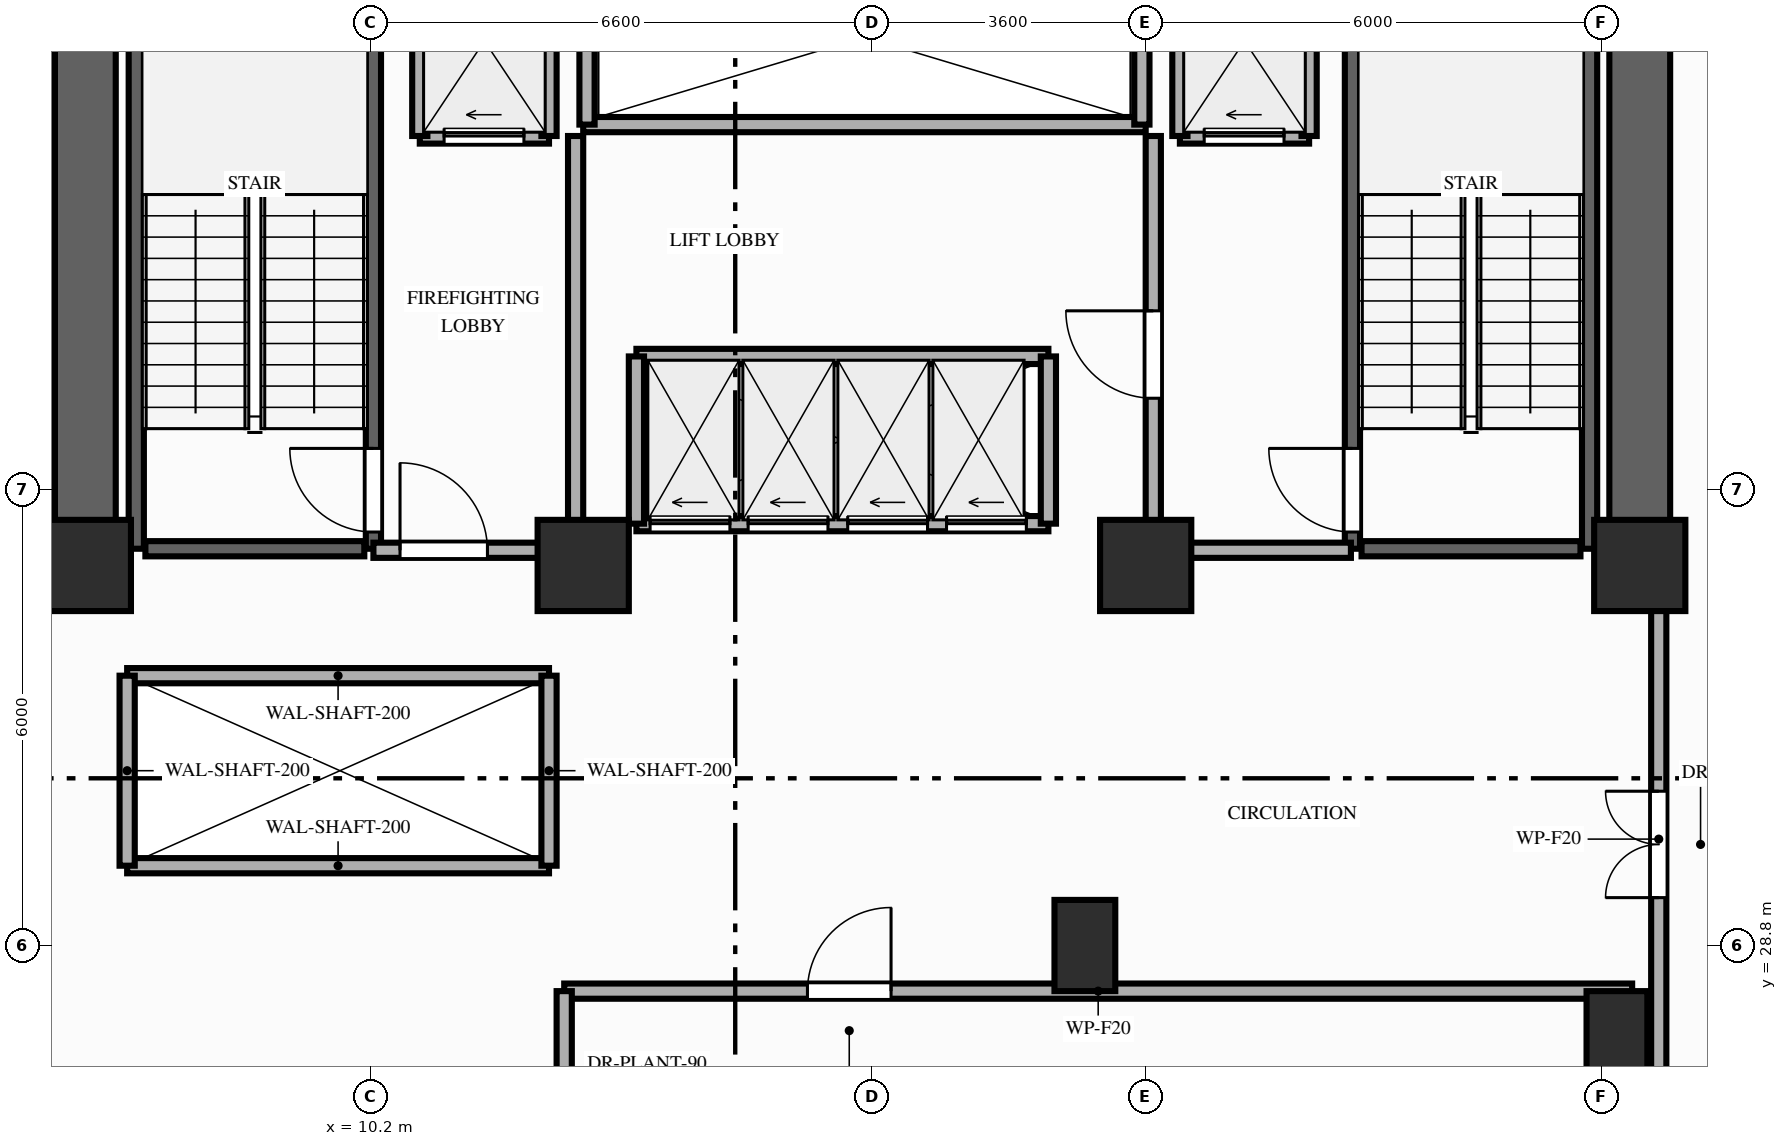
"""IFC4 building model, lengths in metres.
Left out: names, types, materials, properties, quantities, classifications, styles, units other than length and angle.
Written with IfcOpenShell. Run it as: python <this file> out.ifc"""

import sys

from ifc_helpers import new_model, si_unit, direction, frame, frame_2d, origin, origin_2d, place, context, subcontext, project, spatial, rectangle, extrude, element, fill, save


model = new_model("IFC4")
c1 = context("Model", 3, precision=1e-05, world=origin(), true_north=direction((0.0, 1.0)))
c2 = subcontext(c1, "Body", "Model", "MODEL_VIEW")
j1 = project(units=[si_unit("LENGTHUNIT", "METRE"), si_unit("PLANEANGLEUNIT", "RADIAN")], contexts=[c1])
p1 = place(None, origin())
s1 = spatial("IfcSite", under=j1, at=p1, CompositionType="ELEMENT")
p2 = place(p1, origin())
s2 = spatial("IfcBuilding", under=s1, at=p2, CompositionType="ELEMENT")
p3 = place(p2, frame((0.0, 0.0, 79.4)))
s3 = spatial("IfcBuildingStorey", under=s2, at=p3, CompositionType="ELEMENT", Elevation=79.4)
for number, where, z_axis, x_axis in (
    (1, (6.45, 33.8, 0.0), (0.0, 0.0, 1.0), (1.0, 0.0, 0.0)),
    (2, (13.0, 33.8, 0.0), (0.0, 0.0, 1.0), (1.0, 0.0, 0.0)),
    (3, (20.4, 33.8, 0.0), (0.0, 0.0, 1.0), (1.0, 0.0, 0.0)),
    (4, (26.9, 33.8, 0.0), (0.0, 0.0, 1.0), (1.0, 0.0, 0.0)),
):
    element("IfcColumn", number, at=place(p3, frame(where, z_axis=z_axis, x_axis=x_axis)), inside=s3, PredefinedType="COLUMN", context=c2, shape_type="SweptSolid", body=[
        extrude(rectangle(XDim=1.2, YDim=1.2, at=origin_2d()), origin(), (0.0, 0.0, 1.0), 4.0),
    ])
for number, where, z_axis, x_axis in (
    (5, (19.6, 28.8, 0.0), (0.0, 0.0, 1.0), (1.0, 0.0, 0.0)),
    (6, (26.6, 27.6, 0.0), (0.0, 0.0, 1.0), (1.0, 0.0, 0.0)),
):
    element("IfcColumn", number, at=place(p3, frame(where, z_axis=z_axis, x_axis=x_axis)), inside=s3, PredefinedType="COLUMN", context=c2, shape_type="SweptSolid", body=[
        extrude(rectangle(XDim=0.8, YDim=1.2, at=origin_2d()), origin(), (0.0, 0.0, 1.0), 4.0),
    ])
for number, where, z_axis, x_axis in (
    (7, (6.45, 33.8, 0.0), (0.0, 0.0, 1.0), (0.0, 1.0, 0.0)),
    (8, (26.9, 33.8, 0.0), (0.0, 0.0, 1.0), (0.0, 1.0, 0.0)),
):
    element("IfcWall", number, at=place(p3, frame(where, z_axis=z_axis, x_axis=x_axis)), inside=s3, PredefinedType="SHEAR", context=c2, shape_type="SweptSolid", body=[
        extrude(rectangle(XDim=7.95, YDim=0.8, at=frame_2d((3.975, 0.0))), origin(), (0.0, 0.0, 1.0), 3.82),
    ])
p4 = place(p3, frame((7.12, 34.02, 0.0), z_axis=(0.0, 0.0, 1.0), x_axis=(0.0, 1.0, 0.0)))
e9 = element("IfcWall", 9, at=p4, inside=s3, PredefinedType="SHEAR", context=c2, shape_type="SweptSolid", body=[
    extrude(rectangle(XDim=7.78, YDim=0.2, at=frame_2d((3.89, 0.0))), origin(), (0.0, 0.0, 1.0), 3.82),
])
p5 = place(p3, frame((10.24, 34.02, 0.0), z_axis=(0.0, 0.0, 1.0), x_axis=(0.0, 1.0, 0.0)))
e10 = element("IfcWall", 10, at=p5, inside=s3, PredefinedType="SHEAR", context=c2, shape_type="SweptSolid", body=[
    extrude(rectangle(XDim=7.78, YDim=0.2, at=frame_2d((3.89, 0.0))), origin(), (0.0, 0.0, 1.0), 3.82),
])
p6 = place(p5, frame((0.22, 0.0, 0.0)))
e11 = element("IfcOpeningElement", 11, at=p6, cuts=e10, PredefinedType="OPENING", context=c2, shape_type="SweptSolid", body=[
    extrude(rectangle(XDim=1.1, YDim=2.15, at=frame_2d((0.55, 1.075))), frame((0.0, 0.11, 0.0), z_axis=(0.0, -1.0, 0.0), x_axis=(1.0, 0.0, 0.0)), (0.0, 0.0, 1.0), 0.22),
])
p7 = place(p3, frame((7.24, 34.02, 0.0), z_axis=(0.0, 0.0, 1.0), x_axis=(1.0, 0.0, 0.0)))
e12 = element("IfcWall", 12, at=p7, inside=s3, PredefinedType="SHEAR", context=c2, shape_type="SweptSolid", body=[
    extrude(rectangle(XDim=2.88, YDim=0.2, at=frame_2d((1.44, 0.0))), origin(), (0.0, 0.0, 1.0), 3.82),
])
p8 = place(p3, frame((23.12, 34.02, 0.0), z_axis=(0.0, 0.0, 1.0), x_axis=(0.0, 1.0, 0.0)))
e13 = element("IfcWall", 13, at=p8, inside=s3, PredefinedType="SHEAR", context=c2, shape_type="SweptSolid", body=[
    extrude(rectangle(XDim=7.78, YDim=0.2, at=frame_2d((3.89, 0.0))), origin(), (0.0, 0.0, 1.0), 3.82),
])
p9 = place(p8, frame((0.22, 0.0, 0.0)))
e14 = element("IfcOpeningElement", 14, at=p9, cuts=e13, PredefinedType="OPENING", context=c2, shape_type="SweptSolid", body=[
    extrude(rectangle(XDim=1.1, YDim=2.15, at=frame_2d((0.55, 1.075))), frame((0.0, 0.11, 0.0), z_axis=(0.0, -1.0, 0.0), x_axis=(1.0, 0.0, 0.0)), (0.0, 0.0, 1.0), 0.22),
])
p10 = place(p3, frame((26.24, 34.02, 0.0), z_axis=(0.0, 0.0, 1.0), x_axis=(0.0, 1.0, 0.0)))
e15 = element("IfcWall", 15, at=p10, inside=s3, PredefinedType="SHEAR", context=c2, shape_type="SweptSolid", body=[
    extrude(rectangle(XDim=7.78, YDim=0.2, at=frame_2d((3.89, 0.0))), origin(), (0.0, 0.0, 1.0), 3.82),
])
p11 = place(p3, frame((23.24, 34.02, 0.0), z_axis=(0.0, 0.0, 1.0), x_axis=(1.0, 0.0, 0.0)))
e16 = element("IfcWall", 16, at=p11, inside=s3, PredefinedType="SHEAR", context=c2, shape_type="SweptSolid", body=[
    extrude(rectangle(XDim=2.88, YDim=0.2, at=frame_2d((1.44, 0.0))), origin(), (0.0, 0.0, 1.0), 3.82),
])
for number, where, z_axis, x_axis in (
    (17, (7.0, 29.85, 0.0), (0.0, 0.0, 1.0), (1.0, 0.0, 0.0)),
    (18, (7.0, 32.35, 0.0), (0.0, 0.0, 1.0), (1.0, 0.0, 0.0)),
):
    element("IfcWall", number, at=place(p3, frame(where, z_axis=z_axis, x_axis=x_axis)), inside=s3, PredefinedType="MOVABLE", context=c2, shape_type="SweptSolid", body=[
        extrude(rectangle(XDim=5.55, YDim=0.2, at=frame_2d((2.775, 0.0))), origin(), (0.0, 0.0, 1.0), 3.82),
    ])
for number, where, z_axis, x_axis in (
    (19, (7.0, 29.85, 0.0), (0.0, 0.0, 1.0), (0.0, 1.0, 0.0)),
    (20, (12.55, 29.85, 0.0), (0.0, 0.0, 1.0), (0.0, 1.0, 0.0)),
):
    element("IfcWall", number, at=place(p3, frame(where, z_axis=z_axis, x_axis=x_axis)), inside=s3, PredefinedType="MOVABLE", context=c2, shape_type="SweptSolid", body=[
        extrude(rectangle(XDim=2.5, YDim=0.2, at=frame_2d((1.25, 0.0))), origin(), (0.0, 0.0, 1.0), 3.82),
    ])
p12 = place(p3, frame((10.85, 39.45, 0.0), z_axis=(0.0, 0.0, 1.0), x_axis=(1.0, 0.0, 0.0)))
e21 = element("IfcWall", 21, at=p12, inside=s3, PredefinedType="MOVABLE", context=c2, shape_type="SweptSolid", body=[
    extrude(rectangle(XDim=1.7, YDim=0.2, at=frame_2d((0.85, 0.0))), origin(), (0.0, 0.0, 1.0), 3.82),
])
p13 = place(p12, frame((0.32, 0.0, 0.0)))
e22 = element("IfcOpeningElement", 22, at=p13, cuts=e21, PredefinedType="OPENING", context=c2, shape_type="SweptSolid", body=[
    extrude(rectangle(XDim=1.05, YDim=2.15, at=frame_2d((0.525, 1.075))), frame((0.0, 0.11, 0.0), z_axis=(0.0, -1.0, 0.0), x_axis=(1.0, 0.0, 0.0)), (0.0, 0.0, 1.0), 0.22),
])
p14 = place(p3, frame((20.85, 39.45, 0.0), z_axis=(0.0, 0.0, 1.0), x_axis=(1.0, 0.0, 0.0)))
e23 = element("IfcWall", 23, at=p14, inside=s3, PredefinedType="MOVABLE", context=c2, shape_type="SweptSolid", body=[
    extrude(rectangle(XDim=1.7, YDim=0.2, at=frame_2d((0.85, 0.0))), origin(), (0.0, 0.0, 1.0), 3.82),
])
p15 = place(p14, frame((0.32, 0.0, 0.0)))
e24 = element("IfcOpeningElement", 24, at=p15, cuts=e23, PredefinedType="OPENING", context=c2, shape_type="SweptSolid", body=[
    extrude(rectangle(XDim=1.05, YDim=2.15, at=frame_2d((0.525, 1.075))), frame((0.0, 0.11, 0.0), z_axis=(0.0, -1.0, 0.0), x_axis=(1.0, 0.0, 0.0)), (0.0, 0.0, 1.0), 0.22),
])
for number, where, z_axis, x_axis in (
    (25, (10.85, 39.45, 0.0), (0.0, 0.0, 1.0), (0.0, 1.0, 0.0)),
    (26, (12.55, 39.45, 0.0), (0.0, 0.0, 1.0), (0.0, 1.0, 0.0)),
):
    element("IfcWall", number, at=place(p3, frame(where, z_axis=z_axis, x_axis=x_axis)), inside=s3, PredefinedType="MOVABLE", context=c2, shape_type="SweptSolid", body=[
        extrude(rectangle(XDim=2.65, YDim=0.2, at=frame_2d((1.325, 0.0))), origin(), (0.0, 0.0, 1.0), 3.21),
    ])
p16 = place(p3, frame((12.9, 34.0, 0.0), z_axis=(0.0, 0.0, 1.0), x_axis=(0.0, 1.0, 0.0)))
e27 = element("IfcWall", 27, at=p16, inside=s3, PredefinedType="PARTITIONING", context=c2, shape_type="SweptSolid", body=[
    extrude(rectangle(XDim=5.45, YDim=0.2, at=frame_2d((2.725, 0.0))), origin(), (0.0, 0.0, 1.0), 3.21),
])
p17 = place(p3, frame((10.24, 34.0, 0.0), z_axis=(0.0, 0.0, 1.0), x_axis=(1.0, 0.0, 0.0)))
e28 = element("IfcWall", 28, at=p17, inside=s3, PredefinedType="PARTITIONING", context=c2, shape_type="SweptSolid", body=[
    extrude(rectangle(XDim=2.66, YDim=0.2, at=frame_2d((1.33, 0.0))), origin(), (0.0, 0.0, 1.0), 3.21),
])
p18 = place(p17, frame((0.35, 0.0, 0.0)))
e29 = element("IfcOpeningElement", 29, at=p18, cuts=e28, PredefinedType="OPENING", context=c2, shape_type="SweptSolid", body=[
    extrude(rectangle(XDim=1.15, YDim=2.15, at=frame_2d((0.575, 1.075))), frame((0.0, 0.11, 0.0), z_axis=(0.0, -1.0, 0.0), x_axis=(1.0, 0.0, 0.0)), (0.0, 0.0, 1.0), 0.22),
])
for number, where, z_axis, x_axis in (
    (30, (20.85, 39.45, 0.0), (0.0, 0.0, 1.0), (0.0, 1.0, 0.0)),
    (31, (22.55, 39.45, 0.0), (0.0, 0.0, 1.0), (0.0, 1.0, 0.0)),
):
    element("IfcWall", number, at=place(p3, frame(where, z_axis=z_axis, x_axis=x_axis)), inside=s3, PredefinedType="MOVABLE", context=c2, shape_type="SweptSolid", body=[
        extrude(rectangle(XDim=2.65, YDim=0.2, at=frame_2d((1.325, 0.0))), origin(), (0.0, 0.0, 1.0), 3.21),
    ])
p19 = place(p3, frame((20.5, 34.0, 0.0), z_axis=(0.0, 0.0, 1.0), x_axis=(0.0, 1.0, 0.0)))
e32 = element("IfcWall", 32, at=p19, inside=s3, PredefinedType="PARTITIONING", context=c2, shape_type="SweptSolid", body=[
    extrude(rectangle(XDim=5.45, YDim=0.2, at=frame_2d((2.725, 0.0))), origin(), (0.0, 0.0, 1.0), 3.21),
])
p20 = place(p19, frame((2.0, 0.0, 0.0)))
e33 = element("IfcOpeningElement", 33, at=p20, cuts=e32, PredefinedType="OPENING", context=c2, shape_type="SweptSolid", body=[
    extrude(rectangle(XDim=1.15, YDim=2.15, at=frame_2d((0.575, 1.075))), frame((0.0, 0.11, 0.0), z_axis=(0.0, -1.0, 0.0), x_axis=(1.0, 0.0, 0.0)), (0.0, 0.0, 1.0), 0.22),
])
p21 = place(p3, frame((20.5, 34.0, 0.0), z_axis=(0.0, 0.0, 1.0), x_axis=(1.0, 0.0, 0.0)))
e34 = element("IfcWall", 34, at=p21, inside=s3, PredefinedType="PARTITIONING", context=c2, shape_type="SweptSolid", body=[
    extrude(rectangle(XDim=2.6, YDim=0.2, at=frame_2d((1.3, 0.0))), origin(), (0.0, 0.0, 1.0), 3.21),
])
p22 = place(p3, frame((13.0, 39.6, 0.0), z_axis=(0.0, 0.0, 1.0), x_axis=(1.0, 0.0, 0.0)))
e35 = element("IfcWall", 35, at=p22, inside=s3, PredefinedType="MOVABLE", context=c2, shape_type="SweptSolid", body=[
    extrude(rectangle(XDim=7.4, YDim=0.2, at=frame_2d((3.7, 0.0))), origin(), (0.0, 0.0, 1.0), 3.82),
])
for number, where, z_axis, x_axis in (
    (36, (13.05, 39.6, 0.0), (0.0, 0.0, 1.0), (0.0, 1.0, 0.0)),
    (37, (20.35, 39.6, 0.0), (0.0, 0.0, 1.0), (0.0, 1.0, 0.0)),
):
    element("IfcWall", number, at=place(p3, frame(where, z_axis=z_axis, x_axis=x_axis)), inside=s3, PredefinedType="MOVABLE", context=c2, shape_type="SweptSolid", body=[
        extrude(rectangle(XDim=2.18, YDim=0.2, at=frame_2d((1.09, 0.0))), origin(), (0.0, 0.0, 1.0), 3.82),
    ])
p23 = place(p3, frame((13.7, 34.35, 0.0), z_axis=(0.0, 0.0, 1.0), x_axis=(1.0, 0.0, 0.0)))
e38 = element("IfcWall", 38, at=p23, inside=s3, PredefinedType="MOVABLE", context=c2, shape_type="SweptSolid", body=[
    extrude(rectangle(XDim=5.42, YDim=0.2, at=frame_2d((2.71, 0.0))), origin(), (0.0, 0.0, 1.0), 3.82),
])
p24 = place(p23, frame((0.18, 0.0, 0.0)))
e39 = element("IfcOpeningElement", 39, at=p24, cuts=e38, PredefinedType="OPENING", context=c2, shape_type="SweptSolid", body=[
    extrude(rectangle(XDim=1.05, YDim=2.15, at=frame_2d((0.525, 1.075))), frame((0.0, 0.11, 0.0), z_axis=(0.0, -1.0, 0.0), x_axis=(1.0, 0.0, 0.0)), (0.0, 0.0, 1.0), 0.22),
])
p25 = place(p23, frame((1.47, 0.0, 0.0)))
e40 = element("IfcOpeningElement", 40, at=p25, cuts=e38, PredefinedType="OPENING", context=c2, shape_type="SweptSolid", body=[
    extrude(rectangle(XDim=1.05, YDim=2.15, at=frame_2d((0.525, 1.075))), frame((0.0, 0.11, 0.0), z_axis=(0.0, -1.0, 0.0), x_axis=(1.0, 0.0, 0.0)), (0.0, 0.0, 1.0), 0.22),
])
p26 = place(p23, frame((2.78, 0.0, 0.0)))
e41 = element("IfcOpeningElement", 41, at=p26, cuts=e38, PredefinedType="OPENING", context=c2, shape_type="SweptSolid", body=[
    extrude(rectangle(XDim=1.05, YDim=2.15, at=frame_2d((0.525, 1.075))), frame((0.0, 0.11, 0.0), z_axis=(0.0, -1.0, 0.0), x_axis=(1.0, 0.0, 0.0)), (0.0, 0.0, 1.0), 0.22),
])
p27 = place(p23, frame((4.08, 0.0, 0.0)))
e42 = element("IfcOpeningElement", 42, at=p27, cuts=e38, PredefinedType="OPENING", context=c2, shape_type="SweptSolid", body=[
    extrude(rectangle(XDim=1.05, YDim=2.15, at=frame_2d((0.525, 1.075))), frame((0.0, 0.11, 0.0), z_axis=(0.0, -1.0, 0.0), x_axis=(1.0, 0.0, 0.0)), (0.0, 0.0, 1.0), 0.22),
])
p28 = place(p3, frame((13.7, 36.55, 0.0), z_axis=(0.0, 0.0, 1.0), x_axis=(1.0, 0.0, 0.0)))
e43 = element("IfcWall", 43, at=p28, inside=s3, PredefinedType="MOVABLE", context=c2, shape_type="SweptSolid", body=[
    extrude(rectangle(XDim=5.42, YDim=0.2, at=frame_2d((2.71, 0.0))), origin(), (0.0, 0.0, 1.0), 3.82),
])
for number, where, z_axis, x_axis in (
    (44, (13.7, 34.35, 0.0), (0.0, 0.0, 1.0), (0.0, 1.0, 0.0)),
    (45, (19.12, 34.35, 0.0), (0.0, 0.0, 1.0), (0.0, 1.0, 0.0)),
):
    element("IfcWall", number, at=place(p3, frame(where, z_axis=z_axis, x_axis=x_axis)), inside=s3, PredefinedType="MOVABLE", context=c2, shape_type="SweptSolid", body=[
        extrude(rectangle(XDim=2.2, YDim=0.2, at=frame_2d((1.1, 0.0))), origin(), (0.0, 0.0, 1.0), 3.82),
    ])
p29 = place(p3, frame((12.75, 28.2, 0.0), z_axis=(0.0, 0.0, 1.0), x_axis=(1.0, 0.0, 0.0)))
e46 = element("IfcWall", 46, at=p29, inside=s3, PredefinedType="PARTITIONING", context=c2, shape_type="SweptSolid", body=[
    extrude(rectangle(XDim=14.05, YDim=0.2, at=frame_2d((7.025, 0.0))), origin(), (0.0, 0.0, 1.0), 3.21),
])
p30 = place(p29, frame((3.2, 0.0, 0.0)))
e47 = element("IfcOpeningElement", 47, at=p30, cuts=e46, PredefinedType="OPENING", context=c2, shape_type="SweptSolid", body=[
    extrude(rectangle(XDim=1.1, YDim=2.15, at=frame_2d((0.55, 1.075))), frame((0.0, 0.11, 0.0), z_axis=(0.0, -1.0, 0.0), x_axis=(1.0, 0.0, 0.0)), (0.0, 0.0, 1.0), 0.22),
])
p31 = place(p3, frame((12.75, 8.75, 0.0), z_axis=(0.0, 0.0, 1.0), x_axis=(0.0, 1.0, 0.0)))
e48 = element("IfcWall", 48, at=p31, inside=s3, PredefinedType="PARTITIONING", context=c2, shape_type="SweptSolid", body=[
    extrude(rectangle(XDim=19.45, YDim=0.2, at=frame_2d((9.725, 0.0))), origin(), (0.0, 0.0, 1.0), 3.21),
])
p32 = place(p31, frame((16.85, 0.0, 0.0)))
e49 = element("IfcOpeningElement", 49, at=p32, cuts=e48, PredefinedType="OPENING", context=c2, shape_type="SweptSolid", body=[
    extrude(rectangle(XDim=1.4, YDim=2.2, at=frame_2d((0.7, 1.1))), frame((0.0, 0.11, 0.0), z_axis=(0.0, -1.0, 0.0), x_axis=(1.0, 0.0, 0.0)), (0.0, 0.0, 1.0), 0.22),
])
p33 = place(p3, frame((27.15, 26.75, 0.0), z_axis=(0.0, 0.0, 1.0), x_axis=(0.0, 1.0, 0.0)))
e50 = element("IfcWall", 50, at=p33, inside=s3, PredefinedType="PARTITIONING", context=c2, shape_type="SweptSolid", body=[
    extrude(rectangle(XDim=6.9, YDim=0.2, at=frame_2d((3.45, 0.0))), origin(), (0.0, 0.0, 1.0), 3.21),
])
p34 = place(p33, frame((2.68, 0.0, 0.0)))
e51 = element("IfcOpeningElement", 51, at=p34, cuts=e50, PredefinedType="OPENING", context=c2, shape_type="SweptSolid", body=[
    extrude(rectangle(XDim=1.4, YDim=2.2, at=frame_2d((0.7, 1.1))), frame((0.0, 0.11, 0.0), z_axis=(0.0, -1.0, 0.0), x_axis=(1.0, 0.0, 0.0)), (0.0, 0.0, 1.0), 0.22),
])
p35 = place(p6, origin())
e52 = element("IfcDoor", 52, at=p35, inside=s3, OperationType="SINGLE_SWING_RIGHT", PredefinedType="DOOR", context=c2, shape_type="SweptSolid", body=[
    extrude(rectangle(XDim=1.1, YDim=2.15, at=frame_2d((0.55, 1.075))), frame((0.0, 0.025, 0.0), z_axis=(0.0, -1.0, 0.0), x_axis=(1.0, 0.0, 0.0)), (0.0, 0.0, 1.0), 0.05),
])
fill(e11, e52)
p36 = place(p9, origin())
e53 = element("IfcDoor", 53, at=p36, inside=s3, OperationType="SINGLE_SWING_RIGHT", PredefinedType="DOOR", context=c2, shape_type="SweptSolid", body=[
    extrude(rectangle(XDim=1.1, YDim=2.15, at=frame_2d((0.55, 1.075))), frame((0.0, 0.025, 0.0), z_axis=(0.0, -1.0, 0.0), x_axis=(1.0, 0.0, 0.0)), (0.0, 0.0, 1.0), 0.05),
])
fill(e14, e53)
p37 = place(p13, origin())
e54 = element("IfcDoor", 54, at=p37, inside=s3, OperationType="SLIDING_TO_LEFT", PredefinedType="DOOR", context=c2, shape_type="SweptSolid", body=[
    extrude(rectangle(XDim=1.05, YDim=2.15, at=frame_2d((0.525, 1.075))), frame((0.0, 0.025, 0.0), z_axis=(0.0, -1.0, 0.0), x_axis=(1.0, 0.0, 0.0)), (0.0, 0.0, 1.0), 0.05),
])
fill(e22, e54)
p38 = place(p15, origin())
e55 = element("IfcDoor", 55, at=p38, inside=s3, OperationType="SLIDING_TO_LEFT", PredefinedType="DOOR", context=c2, shape_type="SweptSolid", body=[
    extrude(rectangle(XDim=1.05, YDim=2.15, at=frame_2d((0.525, 1.075))), frame((0.0, 0.025, 0.0), z_axis=(0.0, -1.0, 0.0), x_axis=(1.0, 0.0, 0.0)), (0.0, 0.0, 1.0), 0.05),
])
fill(e24, e55)
p39 = place(p18, origin())
e56 = element("IfcDoor", 56, at=p39, inside=s3, OperationType="SINGLE_SWING_LEFT", PredefinedType="DOOR", context=c2, shape_type="SweptSolid", body=[
    extrude(rectangle(XDim=1.15, YDim=2.15, at=frame_2d((0.575, 1.075))), frame((0.0, 0.025, 0.0), z_axis=(0.0, -1.0, 0.0), x_axis=(1.0, 0.0, 0.0)), (0.0, 0.0, 1.0), 0.05),
])
fill(e29, e56)
p40 = place(p20, origin())
e57 = element("IfcDoor", 57, at=p40, inside=s3, OperationType="SINGLE_SWING_RIGHT", PredefinedType="DOOR", context=c2, shape_type="SweptSolid", body=[
    extrude(rectangle(XDim=1.15, YDim=2.15, at=frame_2d((0.575, 1.075))), frame((0.0, 0.025, 0.0), z_axis=(0.0, -1.0, 0.0), x_axis=(1.0, 0.0, 0.0)), (0.0, 0.0, 1.0), 0.05),
])
fill(e33, e57)
p41 = place(p24, origin())
e58 = element("IfcDoor", 58, at=p41, inside=s3, OperationType="SLIDING_TO_LEFT", PredefinedType="DOOR", context=c2, shape_type="SweptSolid", body=[
    extrude(rectangle(XDim=1.05, YDim=2.15, at=frame_2d((0.525, 1.075))), frame((0.0, 0.025, 0.0), z_axis=(0.0, -1.0, 0.0), x_axis=(1.0, 0.0, 0.0)), (0.0, 0.0, 1.0), 0.05),
])
fill(e39, e58)
p42 = place(p25, origin())
e59 = element("IfcDoor", 59, at=p42, inside=s3, OperationType="SLIDING_TO_LEFT", PredefinedType="DOOR", context=c2, shape_type="SweptSolid", body=[
    extrude(rectangle(XDim=1.05, YDim=2.15, at=frame_2d((0.525, 1.075))), frame((0.0, 0.025, 0.0), z_axis=(0.0, -1.0, 0.0), x_axis=(1.0, 0.0, 0.0)), (0.0, 0.0, 1.0), 0.05),
])
fill(e40, e59)
p43 = place(p26, origin())
e60 = element("IfcDoor", 60, at=p43, inside=s3, OperationType="SLIDING_TO_LEFT", PredefinedType="DOOR", context=c2, shape_type="SweptSolid", body=[
    extrude(rectangle(XDim=1.05, YDim=2.15, at=frame_2d((0.525, 1.075))), frame((0.0, 0.025, 0.0), z_axis=(0.0, -1.0, 0.0), x_axis=(1.0, 0.0, 0.0)), (0.0, 0.0, 1.0), 0.05),
])
fill(e41, e60)
p44 = place(p27, origin())
e61 = element("IfcDoor", 61, at=p44, inside=s3, OperationType="SLIDING_TO_LEFT", PredefinedType="DOOR", context=c2, shape_type="SweptSolid", body=[
    extrude(rectangle(XDim=1.05, YDim=2.15, at=frame_2d((0.525, 1.075))), frame((0.0, 0.025, 0.0), z_axis=(0.0, -1.0, 0.0), x_axis=(1.0, 0.0, 0.0)), (0.0, 0.0, 1.0), 0.05),
])
fill(e42, e61)
p45 = place(p30, origin())
e62 = element("IfcDoor", 62, at=p45, inside=s3, OperationType="SINGLE_SWING_RIGHT", PredefinedType="DOOR", context=c2, shape_type="SweptSolid", body=[
    extrude(rectangle(XDim=1.1, YDim=2.15, at=frame_2d((0.55, 1.075))), frame((0.0, 0.025, 0.0), z_axis=(0.0, -1.0, 0.0), x_axis=(1.0, 0.0, 0.0)), (0.0, 0.0, 1.0), 0.05),
])
fill(e47, e62)
p46 = place(p34, origin())
e63 = element("IfcDoor", 63, at=p46, inside=s3, OperationType="DOUBLE_DOOR_SINGLE_SWING", PredefinedType="DOOR", context=c2, shape_type="SweptSolid", body=[
    extrude(rectangle(XDim=1.4, YDim=2.2, at=frame_2d((0.7, 1.1))), frame((0.0, 0.025, 0.0), z_axis=(0.0, -1.0, 0.0), x_axis=(1.0, 0.0, 0.0)), (0.0, 0.0, 1.0), 0.05),
])
fill(e51, e63)
save(model, sys.argv[1])
